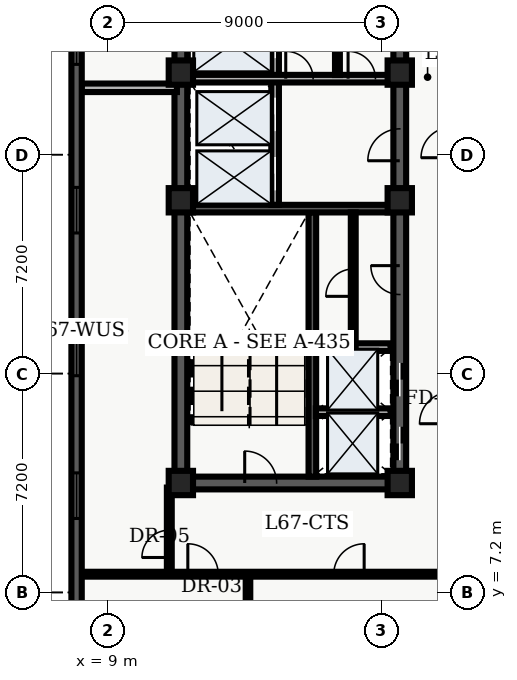
"""IFC4 building model, lengths in metres.
Left out: names, types, materials, properties, quantities, classifications, styles, units other than length and angle.
Written with IfcOpenShell. Run it as: python <this file> out.ifc"""

import sys

from ifc_helpers import new_model, entity, si_unit, converted_unit, direction, frame, origin_with_axes, origin_2d_with_axis, place, context, subcontext, project, spatial, polyline, rectangle, outline, extrude, element, fill, save


model = new_model("IFC4")
c1 = context("Model", 3, precision=1e-05, world=origin_with_axes(), true_north=direction((0.0, 1.0)))
c2 = subcontext(c1, "Body", "Model", "MODEL_VIEW")
j1 = project(units=[si_unit("LENGTHUNIT", "METRE"), converted_unit("PLANEANGLEUNIT", "DEGREE", entity("IfcPlaneAngleMeasure", 0.017), si_unit("PLANEANGLEUNIT", "RADIAN"), dimensions=[0, 0, 0, 0, 0, 0, 0])], contexts=[c1])
p1 = place(None, origin_with_axes())
s1 = spatial("IfcSite", under=j1, at=p1, CompositionType="ELEMENT")
p2 = place(p1, origin_with_axes())
s2 = spatial("IfcBuilding", under=s1, at=p2, CompositionType="ELEMENT")
p3 = place(p2, frame((0.0, 0.0, 272.4), z_axis=(0.0, 0.0, 1.0), x_axis=(1.0, 0.0, 0.0)))
s3 = spatial("IfcBuildingStorey", under=s2, at=p3, CompositionType="ELEMENT", Elevation=272.4)
p4 = place(p3, frame((11.4, 10.8, 0.0), z_axis=(0.0, 0.0, 1.0), x_axis=(0.0, 1.0, 0.0)))
e1 = element("IfcWall", 1, at=p4, inside=s3, PredefinedType="SHEAR", context=c2, shape_type="SweptSolid", body=[
    extrude(outline(polyline([(0.0, -0.21), (27.0, -0.21), (27.0, 0.21), (0.0, 0.21), (0.0, -0.21)])), origin_with_axes(), (0.0, 0.0, 1.0), 3.66),
])
p5 = place(p3, frame((11.4, 10.8, 0.0), z_axis=(0.0, 0.0, 1.0), x_axis=(1.0, 0.0, 0.0)))
e2 = element("IfcWall", 2, at=p5, inside=s3, PredefinedType="SHEAR", context=c2, shape_type="SweptSolid", body=[
    extrude(outline(polyline([(0.0, -0.21), (7.2, -0.21), (7.2, 0.21), (0.0, 0.21), (0.0, -0.21)])), origin_with_axes(), (0.0, 0.0, 1.0), 3.66),
])
p6 = place(p5, frame((2.625, 0.0, 0.0), z_axis=(0.0, 0.0, 1.0), x_axis=(1.0, 0.0, 0.0)))
e3 = element("IfcOpeningElement", 3, at=p6, cuts=e2, PredefinedType="OPENING", context=c2, shape_type="SweptSolid", body=[
    extrude(rectangle(XDim=1.05, YDim=0.44, at=origin_2d_with_axis()), origin_with_axes(), (0.0, 0.0, 1.0), 2.15),
])
p7 = place(p3, frame((18.6, 10.8, 0.0), z_axis=(0.0, 0.0, 1.0), x_axis=(0.0, 1.0, 0.0)))
e4 = element("IfcWall", 4, at=p7, inside=s3, PredefinedType="SHEAR", context=c2, shape_type="SweptSolid", body=[
    extrude(outline(polyline([(0.0, -0.21), (13.5, -0.21), (13.5, 0.21), (0.0, 0.21), (0.0, -0.21)])), origin_with_axes(), (0.0, 0.0, 1.0), 3.66),
])
p8 = place(p7, frame((1.3, 0.0, 0.0), z_axis=(0.0, 0.0, 1.0), x_axis=(1.0, 0.0, 0.0)))
e5 = element("IfcOpeningElement", 5, at=p8, cuts=e4, PredefinedType="OPENING", context=c2, shape_type="SweptSolid", body=[
    extrude(rectangle(XDim=1.1, YDim=0.44, at=origin_2d_with_axis()), origin_with_axes(), (0.0, 0.0, 1.0), 2.15),
])
p9 = place(p7, frame((3.4, 0.0, 0.0), z_axis=(0.0, 0.0, 1.0), x_axis=(1.0, 0.0, 0.0)))
e6 = element("IfcOpeningElement", 6, at=p9, cuts=e4, PredefinedType="OPENING", context=c2, shape_type="SweptSolid", body=[
    extrude(rectangle(XDim=1.1, YDim=0.44, at=origin_2d_with_axis()), origin_with_axes(), (0.0, 0.0, 1.0), 2.15),
])
p10 = place(p7, frame((11.125, 0.0, 0.0), z_axis=(0.0, 0.0, 1.0), x_axis=(1.0, 0.0, 0.0)))
e7 = element("IfcOpeningElement", 7, at=p10, cuts=e4, PredefinedType="OPENING", context=c2, shape_type="SweptSolid", body=[
    extrude(rectangle(XDim=1.05, YDim=0.44, at=origin_2d_with_axis()), origin_with_axes(), (0.0, 0.0, 1.0), 2.15),
])
p11 = place(p7, frame((6.675, 0.0, 0.0), z_axis=(0.0, 0.0, 1.0), x_axis=(1.0, 0.0, 0.0)))
e8 = element("IfcOpeningElement", 8, at=p11, cuts=e4, PredefinedType="OPENING", context=c2, shape_type="SweptSolid", body=[
    extrude(rectangle(XDim=0.95, YDim=0.44, at=origin_2d_with_axis()), origin_with_axes(), (0.0, 0.0, 1.0), 2.15),
])
p12 = place(p3, frame((18.6, 24.3, 0.0), z_axis=(0.0, 0.0, 1.0), x_axis=(0.0, 1.0, 0.0)))
e9 = element("IfcWall", 9, at=p12, inside=s3, PredefinedType="SHEAR", context=c2, shape_type="SweptSolid", body=[
    extrude(outline(polyline([(0.0, -0.21), (13.5, -0.21), (13.5, 0.21), (0.0, 0.21), (0.0, -0.21)])), origin_with_axes(), (0.0, 0.0, 1.0), 3.66),
])
p13 = place(p12, frame((6.725, 0.0, 0.0), z_axis=(0.0, 0.0, 1.0), x_axis=(1.0, 0.0, 0.0)))
e10 = element("IfcOpeningElement", 10, at=p13, cuts=e9, PredefinedType="OPENING", context=c2, shape_type="SweptSolid", body=[
    extrude(rectangle(XDim=1.05, YDim=0.44, at=origin_2d_with_axis()), origin_with_axes(), (0.0, 0.0, 1.0), 2.15),
])
p14 = place(p12, frame((11.125, 0.0, 0.0), z_axis=(0.0, 0.0, 1.0), x_axis=(1.0, 0.0, 0.0)))
e11 = element("IfcOpeningElement", 11, at=p14, cuts=e9, PredefinedType="OPENING", context=c2, shape_type="SweptSolid", body=[
    extrude(rectangle(XDim=1.05, YDim=0.44, at=origin_2d_with_axis()), origin_with_axes(), (0.0, 0.0, 1.0), 2.15),
])
p15 = place(p3, frame((15.725, 11.01, 0.0), z_axis=(0.0, 0.0, 1.0), x_axis=(0.0, 1.0, 0.0)))
e12 = element("IfcWall", 12, at=p15, inside=s3, PredefinedType="SHEAR", context=c2, shape_type="SweptSolid", body=[
    extrude(outline(polyline([(0.0, -0.125), (8.69, -0.125), (8.69, 0.125), (0.0, 0.125), (0.0, -0.125)])), origin_with_axes(), (0.0, 0.0, 1.0), 3.66),
])
p16 = place(p3, frame((11.61, 19.825, 0.0), z_axis=(0.0, 0.0, 1.0), x_axis=(1.0, 0.0, 0.0)))
e13 = element("IfcWall", 13, at=p16, inside=s3, PredefinedType="SHEAR", context=c2, shape_type="SweptSolid", body=[
    extrude(outline(polyline([(0.0, -0.125), (6.78, -0.125), (6.78, 0.125), (0.0, 0.125), (0.0, -0.125)])), origin_with_axes(), (0.0, 0.0, 1.0), 3.66),
])
p17 = place(p3, frame((14.5, 19.95, 0.0), z_axis=(0.0, 0.0, 1.0), x_axis=(0.0, 1.0, 0.0)))
e14 = element("IfcWall", 14, at=p17, inside=s3, PredefinedType="SOLIDWALL", context=c2, shape_type="SweptSolid", body=[
    extrude(outline(polyline([(0.0, -0.125), (6.25, -0.125), (6.25, 0.125), (0.0, 0.125), (0.0, -0.125)])), origin_with_axes(), (0.0, 0.0, 1.0), 2.7),
])
p18 = place(p17, frame((1.025, 0.0, 0.0), z_axis=(0.0, 0.0, 1.0), x_axis=(1.0, 0.0, 0.0)))
e15 = element("IfcOpeningElement", 15, at=p18, cuts=e14, PredefinedType="OPENING", context=c2, shape_type="SweptSolid", body=[
    extrude(rectangle(XDim=1.1, YDim=0.27, at=origin_2d_with_axis()), origin_with_axes(), (0.0, 0.0, 1.0), 2.15),
])
p19 = place(p17, frame((2.975, 0.0, 0.0), z_axis=(0.0, 0.0, 1.0), x_axis=(1.0, 0.0, 0.0)))
e16 = element("IfcOpeningElement", 16, at=p19, cuts=e14, PredefinedType="OPENING", context=c2, shape_type="SweptSolid", body=[
    extrude(rectangle(XDim=1.1, YDim=0.27, at=origin_2d_with_axis()), origin_with_axes(), (0.0, 0.0, 1.0), 2.15),
])
p20 = place(p17, frame((5.425, 0.0, 0.0), z_axis=(0.0, 0.0, 1.0), x_axis=(1.0, 0.0, 0.0)))
e17 = element("IfcOpeningElement", 17, at=p20, cuts=e14, PredefinedType="OPENING", context=c2, shape_type="SweptSolid", body=[
    extrude(rectangle(XDim=1.2, YDim=0.27, at=origin_2d_with_axis()), origin_with_axes(), (0.0, 0.0, 1.0), 2.15),
])
p21 = place(p3, frame((11.7, 24.1, 0.0), z_axis=(0.0, 0.0, 1.0), x_axis=(1.0, 0.0, 0.0)))
e18 = element("IfcWall", 18, at=p21, inside=s3, PredefinedType="SOLIDWALL", context=c2, shape_type="SweptSolid", body=[
    extrude(outline(polyline([(0.0, -0.125), (6.6, -0.125), (6.6, 0.125), (0.0, 0.125), (0.0, -0.125)])), origin_with_axes(), (0.0, 0.0, 1.0), 2.7),
])
p22 = place(p21, frame((3.6, 0.0, 0.0), z_axis=(0.0, 0.0, 1.0), x_axis=(1.0, 0.0, 0.0)))
e19 = element("IfcOpeningElement", 19, at=p22, cuts=e18, PredefinedType="OPENING", context=c2, shape_type="SweptSolid", body=[
    extrude(rectangle(XDim=0.9, YDim=0.27, at=origin_2d_with_axis()), origin_with_axes(), (0.0, 0.0, 1.0), 2.15),
])
p23 = place(p21, frame((5.65, 0.0, 0.0), z_axis=(0.0, 0.0, 1.0), x_axis=(1.0, 0.0, 0.0)))
e20 = element("IfcOpeningElement", 20, at=p23, cuts=e18, PredefinedType="OPENING", context=c2, shape_type="SweptSolid", body=[
    extrude(rectangle(XDim=0.9, YDim=0.27, at=origin_2d_with_axis()), origin_with_axes(), (0.0, 0.0, 1.0), 2.15),
])
for number, where, z_axis, x_axis in (
    (21, (11.4, 10.8, 0.0), (0.0, 0.0, 1.0), (1.0, 0.0, 0.0)),
    (22, (11.4, 20.1, 0.0), (0.0, 0.0, 1.0), (1.0, 0.0, 0.0)),
    (23, (11.4, 24.3, 0.0), (0.0, 0.0, 1.0), (1.0, 0.0, 0.0)),
    (24, (18.6, 10.8, 0.0), (0.0, 0.0, 1.0), (1.0, 0.0, 0.0)),
    (25, (18.6, 20.1, 0.0), (0.0, 0.0, 1.0), (1.0, 0.0, 0.0)),
    (26, (18.6, 24.3, 0.0), (0.0, 0.0, 1.0), (1.0, 0.0, 0.0)),
):
    element("IfcColumn", number, at=place(p3, frame(where, z_axis=z_axis, x_axis=x_axis)), inside=s3, PredefinedType="COLUMN", context=c2, shape_type="SweptSolid", body=[
        extrude(rectangle(XDim=0.8, YDim=0.8, at=origin_2d_with_axis()), origin_with_axes(), (0.0, 0.0, 1.0), 3.9),
    ])
p24 = place(p3, frame((16.55, 24.22, 0.0), z_axis=(0.0, 0.0, 1.0), x_axis=(0.0, 1.0, 0.0)))
e27 = element("IfcWall", 27, at=p24, inside=s3, PredefinedType="PARTITIONING", context=c2, shape_type="SweptSolid", body=[
    extrude(outline(polyline([(0.0, -0.08), (1.98, -0.08), (1.98, 0.08), (0.0, 0.08), (0.0, -0.08)])), origin_with_axes(), (0.0, 0.0, 1.0), 2.7),
])
for number, where, z_axis, x_axis in (
    (28, (15.84, 13.13, 0.0), (0.0, 0.0, 1.0), (1.0, 0.0, 0.0)),
    (29, (15.84, 15.27, 0.0), (0.0, 0.0, 1.0), (1.0, 0.0, 0.0)),
):
    element("IfcWall", number, at=place(p3, frame(where, z_axis=z_axis, x_axis=x_axis)), inside=s3, PredefinedType="SOLIDWALL", context=c2, shape_type="SweptSolid", body=[
        extrude(outline(polyline([(0.0, -0.125), (2.46, -0.125), (2.46, 0.125), (0.0, 0.125), (0.0, -0.125)])), origin_with_axes(), (0.0, 0.0, 1.0), 2.7),
    ])
p25 = place(p3, frame((17.07, 15.34, 0.0), z_axis=(0.0, 0.0, 1.0), x_axis=(0.0, 1.0, 0.0)))
e30 = element("IfcWall", 30, at=p25, inside=s3, PredefinedType="PARTITIONING", context=c2, shape_type="SweptSolid", body=[
    extrude(outline(polyline([(0.0, -0.08), (4.36, -0.08), (4.36, 0.08), (0.0, 0.08), (0.0, -0.08)])), origin_with_axes(), (0.0, 0.0, 1.0), 2.7),
])
p26 = place(p25, frame((2.05, 0.0, 0.0), z_axis=(0.0, 0.0, 1.0), x_axis=(1.0, 0.0, 0.0)))
e31 = element("IfcOpeningElement", 31, at=p26, cuts=e30, PredefinedType="OPENING", context=c2, shape_type="SweptSolid", body=[
    extrude(rectangle(XDim=0.9, YDim=0.18, at=origin_2d_with_axis()), origin_with_axes(), (0.0, 0.0, 1.0), 2.15),
])
p27 = place(p3, frame((8.135, 7.8, 0.0), z_axis=(0.0, 0.0, 1.0), x_axis=(1.0, 0.0, 0.0)))
e32 = element("IfcWall", 32, at=p27, inside=s3, PredefinedType="PARTITIONING", context=c2, shape_type="SweptSolid", body=[
    extrude(outline(polyline([(0.0, -0.08), (12.165, -0.08), (12.165, 0.08), (0.0, 0.08), (0.0, -0.08)])), origin_with_axes(), (0.0, 0.0, 1.0), 2.7),
])
p28 = place(p27, frame((3.994, 0.0, 0.0), z_axis=(0.0, 0.0, 1.0), x_axis=(1.0, 0.0, 0.0)))
e33 = element("IfcOpeningElement", 33, at=p28, cuts=e32, PredefinedType="OPENING", context=c2, shape_type="SweptSolid", body=[
    extrude(rectangle(XDim=1.0, YDim=0.18, at=origin_2d_with_axis()), origin_with_axes(), (0.0, 0.0, 1.0), 2.15),
])
p29 = place(p27, frame((8.794, 0.0, 0.0), z_axis=(0.0, 0.0, 1.0), x_axis=(1.0, 0.0, 0.0)))
e34 = element("IfcOpeningElement", 34, at=p29, cuts=e32, PredefinedType="OPENING", context=c2, shape_type="SweptSolid", body=[
    extrude(rectangle(XDim=1.0, YDim=0.18, at=origin_2d_with_axis()), origin_with_axes(), (0.0, 0.0, 1.0), 2.15),
])
p30 = place(p3, frame((11.02, 7.8, 0.0), z_axis=(0.0, 0.0, 1.0), x_axis=(0.0, 1.0, 0.0)))
e35 = element("IfcWall", 35, at=p30, inside=s3, PredefinedType="PARTITIONING", context=c2, shape_type="SweptSolid", body=[
    extrude(outline(polyline([(0.0, -0.08), (2.85, -0.08), (2.85, 0.08), (0.0, 0.08), (0.0, -0.08)])), origin_with_axes(), (0.0, 0.0, 1.0), 2.7),
])
p31 = place(p30, frame((1.0, 0.0, 0.0), z_axis=(0.0, 0.0, 1.0), x_axis=(1.0, 0.0, 0.0)))
e36 = element("IfcOpeningElement", 36, at=p31, cuts=e35, PredefinedType="OPENING", context=c2, shape_type="SweptSolid", body=[
    extrude(rectangle(XDim=0.9, YDim=0.18, at=origin_2d_with_axis()), origin_with_axes(), (0.0, 0.0, 1.0), 2.15),
])
p32 = place(p3, frame((8.135, 23.8, 0.0), z_axis=(0.0, 0.0, 1.0), x_axis=(1.0, 0.0, 0.0)))
e37 = element("IfcWall", 37, at=p32, inside=s3, PredefinedType="PARTITIONING", context=c2, shape_type="SweptSolid", body=[
    extrude(outline(polyline([(0.0, -0.14), (3.135, -0.14), (3.135, 0.14), (0.0, 0.14), (0.0, -0.14)])), origin_with_axes(), (0.0, 0.0, 1.0), 2.7),
])
p33 = place(p3, frame((13.608, 2.58, 0.0), z_axis=(0.0, 0.0, 1.0), x_axis=(0.0, 1.0, 0.0)))
e38 = element("IfcWall", 38, at=p33, inside=s3, PredefinedType="PARTITIONING", context=c2, shape_type="SweptSolid", body=[
    extrude(outline(polyline([(0.0, -0.075), (5.12, -0.075), (5.12, 0.075), (0.0, 0.075), (0.0, -0.075)])), origin_with_axes(), (0.0, 0.0, 1.0), 2.7),
])
p34 = place(p3, frame((7.97, 2.74, 0.0), z_axis=(0.0, 0.0, 1.0), x_axis=(0.0, 1.0, 0.0)))
e39 = element("IfcWall", 39, at=p34, inside=s3, PredefinedType="SOLIDWALL", context=c2, shape_type="SweptSolid", body=[
    extrude(outline(polyline([(0.0, -0.17), (43.46, -0.17), (43.46, 0.17), (0.0, 0.17), (0.0, -0.17)])), origin_with_axes(), (0.0, 0.0, 1.0), 3.66),
])
p35 = place(p34, frame((2.948, 0.0, 0.45), z_axis=(0.0, 0.0, 1.0), x_axis=(1.0, 0.0, 0.0)))
e40 = element("IfcOpeningElement", 40, at=p35, cuts=e39, PredefinedType="OPENING", context=c2, shape_type="SweptSolid", body=[
    extrude(rectangle(XDim=1.5, YDim=0.36, at=origin_2d_with_axis()), origin_with_axes(), (0.0, 0.0, 1.0), 2.1),
])
p36 = place(p34, frame((7.643, 0.0, 0.45), z_axis=(0.0, 0.0, 1.0), x_axis=(1.0, 0.0, 0.0)))
e41 = element("IfcOpeningElement", 41, at=p36, cuts=e39, PredefinedType="OPENING", context=c2, shape_type="SweptSolid", body=[
    extrude(rectangle(XDim=1.5, YDim=0.36, at=origin_2d_with_axis()), origin_with_axes(), (0.0, 0.0, 1.0), 2.1),
])
p37 = place(p34, frame((12.339, 0.0, 0.45), z_axis=(0.0, 0.0, 1.0), x_axis=(1.0, 0.0, 0.0)))
e42 = element("IfcOpeningElement", 42, at=p37, cuts=e39, PredefinedType="OPENING", context=c2, shape_type="SweptSolid", body=[
    extrude(rectangle(XDim=1.5, YDim=0.36, at=origin_2d_with_axis()), origin_with_axes(), (0.0, 0.0, 1.0), 2.1),
])
p38 = place(p34, frame((17.034, 0.0, 0.45), z_axis=(0.0, 0.0, 1.0), x_axis=(1.0, 0.0, 0.0)))
e43 = element("IfcOpeningElement", 43, at=p38, cuts=e39, PredefinedType="OPENING", context=c2, shape_type="SweptSolid", body=[
    extrude(rectangle(XDim=1.5, YDim=0.36, at=origin_2d_with_axis()), origin_with_axes(), (0.0, 0.0, 1.0), 2.1),
])
p39 = place(p34, frame((22.58, 0.0, 0.45), z_axis=(0.0, 0.0, 1.0), x_axis=(1.0, 0.0, 0.0)))
e44 = element("IfcOpeningElement", 44, at=p39, cuts=e39, PredefinedType="OPENING", context=c2, shape_type="SweptSolid", body=[
    extrude(rectangle(XDim=1.5, YDim=0.36, at=origin_2d_with_axis()), origin_with_axes(), (0.0, 0.0, 1.0), 2.1),
])
p40 = place(p34, frame((26.426, 0.0, 0.45), z_axis=(0.0, 0.0, 1.0), x_axis=(1.0, 0.0, 0.0)))
e45 = element("IfcOpeningElement", 45, at=p40, cuts=e39, PredefinedType="OPENING", context=c2, shape_type="SweptSolid", body=[
    extrude(rectangle(XDim=1.5, YDim=0.36, at=origin_2d_with_axis()), origin_with_axes(), (0.0, 0.0, 1.0), 2.1),
])
p41 = place(p34, frame((31.121, 0.0, 0.45), z_axis=(0.0, 0.0, 1.0), x_axis=(1.0, 0.0, 0.0)))
e46 = element("IfcOpeningElement", 46, at=p41, cuts=e39, PredefinedType="OPENING", context=c2, shape_type="SweptSolid", body=[
    extrude(rectangle(XDim=1.5, YDim=0.36, at=origin_2d_with_axis()), origin_with_axes(), (0.0, 0.0, 1.0), 2.1),
])
p42 = place(p34, frame((35.817, 0.0, 0.45), z_axis=(0.0, 0.0, 1.0), x_axis=(1.0, 0.0, 0.0)))
e47 = element("IfcOpeningElement", 47, at=p42, cuts=e39, PredefinedType="OPENING", context=c2, shape_type="SweptSolid", body=[
    extrude(rectangle(XDim=1.5, YDim=0.36, at=origin_2d_with_axis()), origin_with_axes(), (0.0, 0.0, 1.0), 2.1),
])
p43 = place(p34, frame((40.512, 0.0, 0.45), z_axis=(0.0, 0.0, 1.0), x_axis=(1.0, 0.0, 0.0)))
e48 = element("IfcOpeningElement", 48, at=p43, cuts=e39, PredefinedType="OPENING", context=c2, shape_type="SweptSolid", body=[
    extrude(rectangle(XDim=1.5, YDim=0.36, at=origin_2d_with_axis()), origin_with_axes(), (0.0, 0.0, 1.0), 2.1),
])
p44 = place(p7, frame((1.3, 0.0, 0.0), z_axis=(0.0, 0.0, 1.0), x_axis=(1.0, 0.0, 0.0)))
e49 = element("IfcDoor", 49, at=p44, inside=s3, OperationType="SLIDING_TO_LEFT", PredefinedType="DOOR", context=c2, shape_type="SweptSolid", body=[
    extrude(rectangle(XDim=1.1, YDim=0.09, at=origin_2d_with_axis()), origin_with_axes(), (0.0, 0.0, 1.0), 2.15),
])
fill(e5, e49)
p45 = place(p7, frame((3.4, 0.0, 0.0), z_axis=(0.0, 0.0, 1.0), x_axis=(1.0, 0.0, 0.0)))
e50 = element("IfcDoor", 50, at=p45, inside=s3, OperationType="SLIDING_TO_RIGHT", PredefinedType="DOOR", context=c2, shape_type="SweptSolid", body=[
    extrude(rectangle(XDim=1.1, YDim=0.09, at=origin_2d_with_axis()), origin_with_axes(), (0.0, 0.0, 1.0), 2.15),
])
fill(e6, e50)
p46 = place(p17, frame((1.025, 0.0, 0.0), z_axis=(0.0, 0.0, 1.0), x_axis=(1.0, 0.0, 0.0)))
e51 = element("IfcDoor", 51, at=p46, inside=s3, OperationType="SLIDING_TO_LEFT", PredefinedType="DOOR", context=c2, shape_type="SweptSolid", body=[
    extrude(rectangle(XDim=1.1, YDim=0.09, at=origin_2d_with_axis()), origin_with_axes(), (0.0, 0.0, 1.0), 2.15),
])
fill(e15, e51)
p47 = place(p17, frame((2.975, 0.0, 0.0), z_axis=(0.0, 0.0, 1.0), x_axis=(1.0, 0.0, 0.0)))
e52 = element("IfcDoor", 52, at=p47, inside=s3, OperationType="SLIDING_TO_RIGHT", PredefinedType="DOOR", context=c2, shape_type="SweptSolid", body=[
    extrude(rectangle(XDim=1.1, YDim=0.09, at=origin_2d_with_axis()), origin_with_axes(), (0.0, 0.0, 1.0), 2.15),
])
fill(e16, e52)
p48 = place(p17, frame((5.425, 0.0, 0.0), z_axis=(0.0, 0.0, 1.0), x_axis=(1.0, 0.0, 0.0)))
e53 = element("IfcDoor", 53, at=p48, inside=s3, OperationType="DOUBLE_DOOR_SLIDING", PredefinedType="DOOR", context=c2, shape_type="SweptSolid", body=[
    extrude(rectangle(XDim=1.2, YDim=0.09, at=origin_2d_with_axis()), origin_with_axes(), (0.0, 0.0, 1.0), 2.15),
])
fill(e17, e53)
p49 = place(p5, frame((2.625, 0.0, 0.0), z_axis=(0.0, 0.0, 1.0), x_axis=(1.0, 0.0, 0.0)))
e54 = element("IfcDoor", 54, at=p49, inside=s3, OperationType="SINGLE_SWING_LEFT", PredefinedType="DOOR", context=c2, shape_type="SweptSolid", body=[
    extrude(rectangle(XDim=1.05, YDim=0.09, at=origin_2d_with_axis()), origin_with_axes(), (0.0, 0.0, 1.0), 2.15),
])
fill(e3, e54)
p50 = place(p7, frame((11.125, 0.0, 0.0), z_axis=(0.0, 0.0, 1.0), x_axis=(1.0, 0.0, 0.0)))
e55 = element("IfcDoor", 55, at=p50, inside=s3, OperationType="SINGLE_SWING_LEFT", PredefinedType="DOOR", context=c2, shape_type="SweptSolid", body=[
    extrude(rectangle(XDim=1.05, YDim=0.09, at=origin_2d_with_axis()), origin_with_axes(), (0.0, 0.0, 1.0), 2.15),
])
fill(e7, e55)
p51 = place(p21, frame((3.6, 0.0, 0.0), z_axis=(0.0, 0.0, 1.0), x_axis=(1.0, 0.0, 0.0)))
e56 = element("IfcDoor", 56, at=p51, inside=s3, OperationType="SINGLE_SWING_LEFT", PredefinedType="DOOR", context=c2, shape_type="SweptSolid", body=[
    extrude(rectangle(XDim=0.9, YDim=0.09, at=origin_2d_with_axis()), origin_with_axes(), (0.0, 0.0, 1.0), 2.15),
])
fill(e19, e56)
p52 = place(p21, frame((5.65, 0.0, 0.0), z_axis=(0.0, 0.0, 1.0), x_axis=(1.0, 0.0, 0.0)))
e57 = element("IfcDoor", 57, at=p52, inside=s3, OperationType="SINGLE_SWING_LEFT", PredefinedType="DOOR", context=c2, shape_type="SweptSolid", body=[
    extrude(rectangle(XDim=0.9, YDim=0.09, at=origin_2d_with_axis()), origin_with_axes(), (0.0, 0.0, 1.0), 2.15),
])
fill(e20, e57)
p53 = place(p25, frame((2.05, 0.0, 0.0), z_axis=(0.0, 0.0, 1.0), x_axis=(1.0, 0.0, 0.0)))
e58 = element("IfcDoor", 58, at=p53, inside=s3, OperationType="SINGLE_SWING_LEFT", PredefinedType="DOOR", context=c2, shape_type="SweptSolid", body=[
    extrude(rectangle(XDim=0.9, YDim=0.09, at=origin_2d_with_axis()), origin_with_axes(), (0.0, 0.0, 1.0), 2.15),
])
fill(e31, e58)
p54 = place(p7, frame((6.675, 0.0, 0.0), z_axis=(0.0, 0.0, 1.0), x_axis=(1.0, 0.0, 0.0)))
e59 = element("IfcDoor", 59, at=p54, inside=s3, OperationType="SINGLE_SWING_RIGHT", PredefinedType="DOOR", context=c2, shape_type="SweptSolid", body=[
    extrude(rectangle(XDim=0.95, YDim=0.09, at=origin_2d_with_axis()), origin_with_axes(), (0.0, 0.0, 1.0), 2.15),
])
fill(e8, e59)
p55 = place(p30, frame((1.0, 0.0, 0.0), z_axis=(0.0, 0.0, 1.0), x_axis=(1.0, 0.0, 0.0)))
e60 = element("IfcDoor", 60, at=p55, inside=s3, OperationType="SINGLE_SWING_LEFT", PredefinedType="DOOR", context=c2, shape_type="SweptSolid", body=[
    extrude(rectangle(XDim=0.9, YDim=0.09, at=origin_2d_with_axis()), origin_with_axes(), (0.0, 0.0, 1.0), 2.15),
])
fill(e36, e60)
p56 = place(p27, frame((3.994, 0.0, 0.0), z_axis=(0.0, 0.0, 1.0), x_axis=(1.0, 0.0, 0.0)))
e61 = element("IfcDoor", 61, at=p56, inside=s3, OperationType="SINGLE_SWING_LEFT", PredefinedType="DOOR", context=c2, shape_type="SweptSolid", body=[
    extrude(rectangle(XDim=1.0, YDim=0.09, at=origin_2d_with_axis()), origin_with_axes(), (0.0, 0.0, 1.0), 2.15),
])
fill(e33, e61)
p57 = place(p27, frame((8.794, 0.0, 0.0), z_axis=(0.0, 0.0, 1.0), x_axis=(1.0, 0.0, 0.0)))
e62 = element("IfcDoor", 62, at=p57, inside=s3, OperationType="SINGLE_SWING_RIGHT", PredefinedType="DOOR", context=c2, shape_type="SweptSolid", body=[
    extrude(rectangle(XDim=1.0, YDim=0.09, at=origin_2d_with_axis()), origin_with_axes(), (0.0, 0.0, 1.0), 2.15),
])
fill(e34, e62)
p58 = place(p34, frame((7.643, 0.0, 0.45), z_axis=(0.0, 0.0, 1.0), x_axis=(1.0, 0.0, 0.0)))
e63 = element("IfcWindow", 63, at=p58, inside=s3, PredefinedType="WINDOW", context=c2, shape_type="SweptSolid", body=[
    extrude(rectangle(XDim=1.5, YDim=0.09, at=origin_2d_with_axis()), origin_with_axes(), (0.0, 0.0, 1.0), 2.1),
])
fill(e41, e63)
p59 = place(p34, frame((12.339, 0.0, 0.45), z_axis=(0.0, 0.0, 1.0), x_axis=(1.0, 0.0, 0.0)))
e64 = element("IfcWindow", 64, at=p59, inside=s3, PredefinedType="WINDOW", context=c2, shape_type="SweptSolid", body=[
    extrude(rectangle(XDim=1.5, YDim=0.09, at=origin_2d_with_axis()), origin_with_axes(), (0.0, 0.0, 1.0), 2.1),
])
fill(e42, e64)
p60 = place(p34, frame((17.034, 0.0, 0.45), z_axis=(0.0, 0.0, 1.0), x_axis=(1.0, 0.0, 0.0)))
e65 = element("IfcWindow", 65, at=p60, inside=s3, PredefinedType="WINDOW", context=c2, shape_type="SweptSolid", body=[
    extrude(rectangle(XDim=1.5, YDim=0.09, at=origin_2d_with_axis()), origin_with_axes(), (0.0, 0.0, 1.0), 2.1),
])
fill(e43, e65)
p61 = place(p34, frame((22.58, 0.0, 0.45), z_axis=(0.0, 0.0, 1.0), x_axis=(1.0, 0.0, 0.0)))
e66 = element("IfcWindow", 66, at=p61, inside=s3, PredefinedType="WINDOW", context=c2, shape_type="SweptSolid", body=[
    extrude(rectangle(XDim=1.5, YDim=0.09, at=origin_2d_with_axis()), origin_with_axes(), (0.0, 0.0, 1.0), 2.1),
])
fill(e44, e66)
save(model, sys.argv[1])
